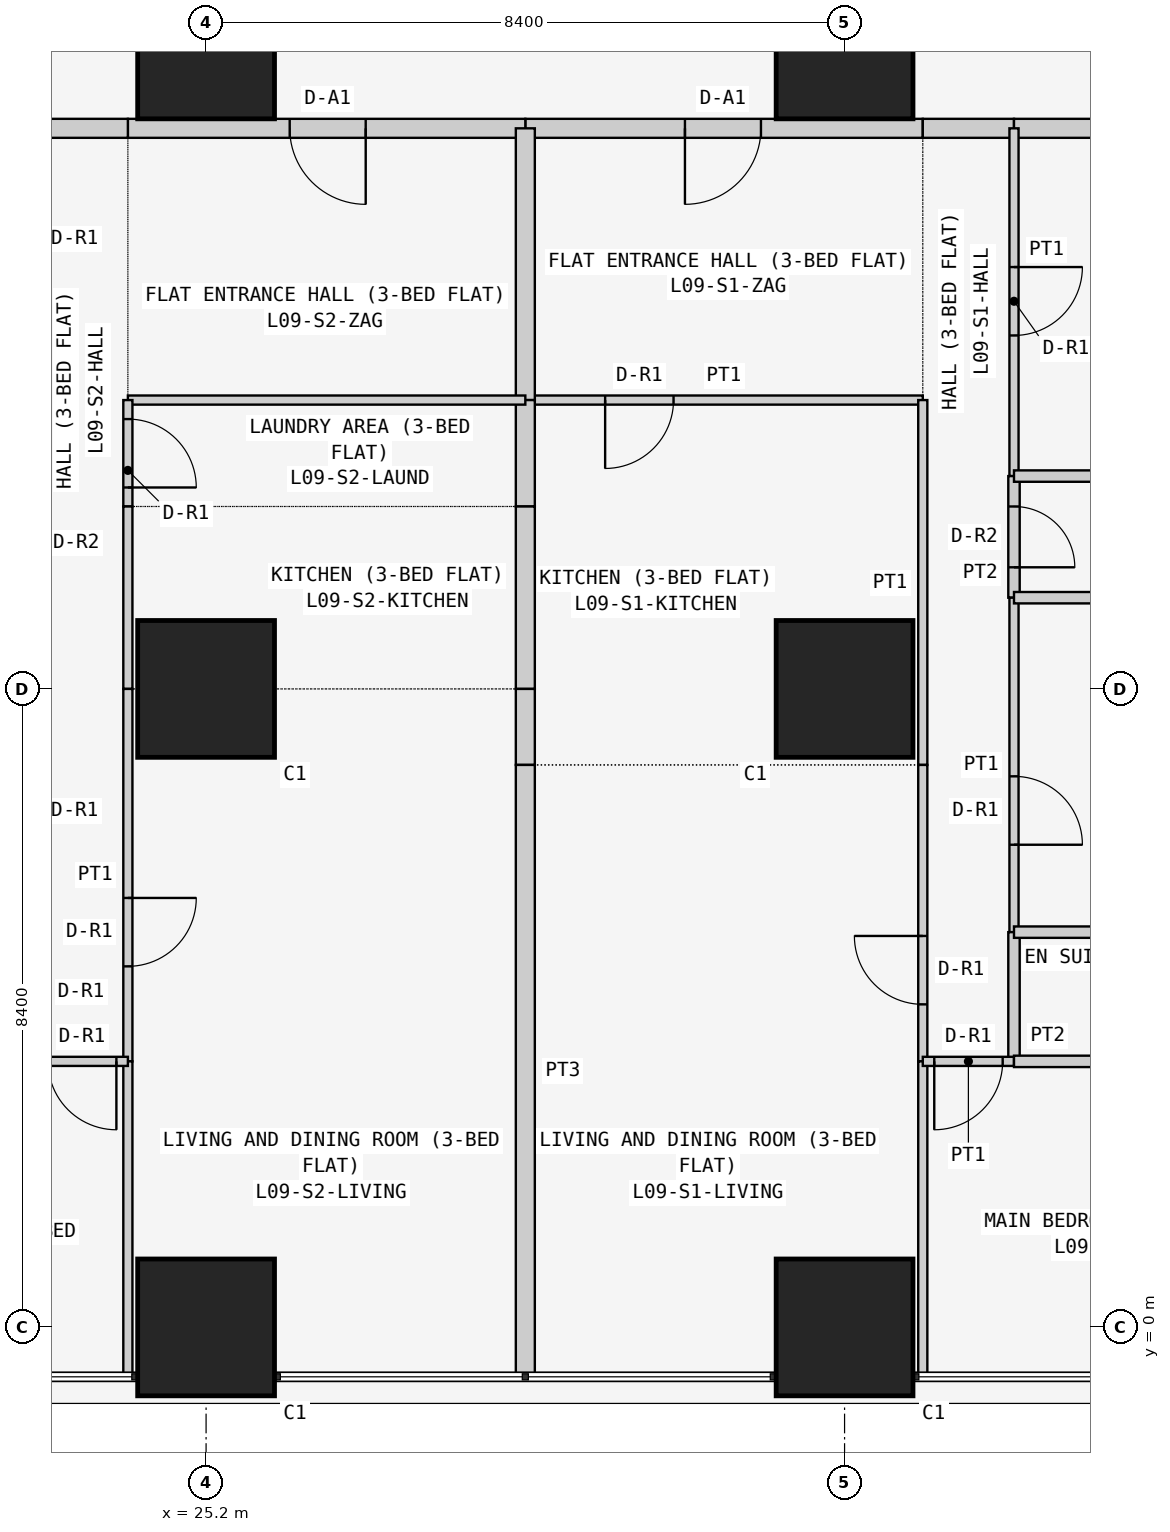
"""IFC4 building model, lengths in metres.
Left out: names, types, materials, properties, quantities, classifications, styles, units other than length and angle.
Written with IfcOpenShell. Run it as: python <this file> out.ifc"""

import sys

from ifc_helpers import new_model, si_unit, direction, frame, frame_2d, origin, origin_2d, place, context, subcontext, project, spatial, rectangle, extrude, element, fill, save


model = new_model("IFC4")
c1 = context("Model", 3, precision=1e-05, world=origin(), true_north=direction((0.0, 1.0)))
c2 = subcontext(c1, "Body", "Model", "MODEL_VIEW")
j1 = project(units=[si_unit("LENGTHUNIT", "METRE"), si_unit("PLANEANGLEUNIT", "RADIAN")], contexts=[c1])
p1 = place(None, origin())
s1 = spatial("IfcSite", under=j1, at=p1, CompositionType="ELEMENT")
p2 = place(p1, origin())
s2 = spatial("IfcBuilding", under=s1, at=p2, CompositionType="ELEMENT")
p3 = place(p2, frame((0.0, 0.0, 41.7)))
s3 = spatial("IfcBuildingStorey", under=s2, at=p3, CompositionType="ELEMENT", Elevation=41.7)
for number, where, z_axis, x_axis in (
    (1, (25.2, 0.0, 0.0), (0.0, 0.0, 1.0), (1.0, 0.0, 0.0)),
    (2, (25.2, 8.4, 0.0), (0.0, 0.0, 1.0), (1.0, 0.0, 0.0)),
    (3, (25.2, 16.8, 0.0), (0.0, 0.0, 1.0), (1.0, 0.0, 0.0)),
    (4, (33.6, 0.0, 0.0), (0.0, 0.0, 1.0), (1.0, 0.0, 0.0)),
    (5, (33.6, 8.4, 0.0), (0.0, 0.0, 1.0), (1.0, 0.0, 0.0)),
    (6, (33.6, 16.8, 0.0), (0.0, 0.0, 1.0), (1.0, 0.0, 0.0)),
):
    element("IfcColumn", number, at=place(p3, frame(where, z_axis=z_axis, x_axis=x_axis)), inside=s3, PredefinedType="COLUMN", context=c2, shape_type="SweptSolid", body=[
        extrude(rectangle(XDim=1.8, YDim=1.8, at=origin_2d()), origin(), (0.0, 0.0, 1.0), 3.6),
    ])
p4 = place(p3, frame((34.629, 15.775, 0.0), z_axis=(0.0, 0.0, 1.0), x_axis=(-1.0, 0.0, 0.0)))
e7 = element("IfcWall", 7, at=p4, inside=s3, PredefinedType="PARTITIONING", context=c2, shape_type="SweptSolid", body=[
    extrude(rectangle(XDim=5.229, YDim=0.25, at=frame_2d((2.615, 0.0))), origin(), (0.0, 0.0, 1.0), 3.45),
])
p5 = place(p4, frame((2.129, 0.0, 0.0)))
e8 = element("IfcOpeningElement", 8, at=p5, cuts=e7, PredefinedType="OPENING", context=c2, shape_type="SweptSolid", body=[
    extrude(rectangle(XDim=1.0, YDim=2.1, at=frame_2d((0.5, 1.05))), frame((0.0, 0.135, 0.0), z_axis=(0.0, -1.0, 0.0), x_axis=(1.0, 0.0, 0.0)), (0.0, 0.0, 1.0), 0.27),
])
p6 = place(p3, frame((35.829, 15.775, 0.0), z_axis=(0.0, 0.0, 1.0), x_axis=(-1.0, 0.0, 0.0)))
e9 = element("IfcWall", 9, at=p6, inside=s3, PredefinedType="PARTITIONING", context=c2, shape_type="SweptSolid", body=[
    extrude(rectangle(XDim=1.2, YDim=0.25, at=frame_2d((0.6, 0.0))), origin(), (0.0, 0.0, 1.0), 3.45),
])
p7 = place(p3, frame((42.7, 15.775, 0.0), z_axis=(0.0, 0.0, 1.0), x_axis=(-1.0, 0.0, 0.0)))
e10 = element("IfcWall", 10, at=p7, inside=s3, PredefinedType="PARTITIONING", context=c2, shape_type="SweptSolid", body=[
    extrude(rectangle(XDim=6.871, YDim=0.25, at=frame_2d((3.436, 0.0))), origin(), (0.0, 0.0, 1.0), 3.45),
])
p8 = place(p3, frame((29.4, 15.775, 0.0), z_axis=(0.0, 0.0, 1.0), x_axis=(-1.0, 0.0, 0.0)))
e11 = element("IfcWall", 11, at=p8, inside=s3, PredefinedType="PARTITIONING", context=c2, shape_type="SweptSolid", body=[
    extrude(rectangle(XDim=5.229, YDim=0.25, at=frame_2d((2.615, 0.0))), origin(), (0.0, 0.0, 1.0), 3.45),
])
p9 = place(p8, frame((2.1, 0.0, 0.0)))
e12 = element("IfcOpeningElement", 12, at=p9, cuts=e11, PredefinedType="OPENING", context=c2, shape_type="SweptSolid", body=[
    extrude(rectangle(XDim=1.0, YDim=2.1, at=frame_2d((0.5, 1.05))), frame((0.0, 0.135, 0.0), z_axis=(0.0, -1.0, 0.0), x_axis=(1.0, 0.0, 0.0)), (0.0, 0.0, 1.0), 0.27),
])
p10 = place(p3, frame((24.171, 15.775, 0.0), z_axis=(0.0, 0.0, 1.0), x_axis=(-1.0, 0.0, 0.0)))
e13 = element("IfcWall", 13, at=p10, inside=s3, PredefinedType="PARTITIONING", context=c2, shape_type="SweptSolid", body=[
    extrude(rectangle(XDim=1.2, YDim=0.25, at=frame_2d((0.6, 0.0))), origin(), (0.0, 0.0, 1.0), 3.45),
])
p11 = place(p3, frame((29.4, 12.2, 0.0), z_axis=(0.0, 0.0, 1.0), x_axis=(1.0, 0.0, 0.0)))
e14 = element("IfcWall", 14, at=p11, inside=s3, PredefinedType="PARTITIONING", context=c2, shape_type="SweptSolid", body=[
    extrude(rectangle(XDim=5.229, YDim=0.12, at=frame_2d((2.615, 0.0))), origin(), (0.0, 0.0, 1.0), 3.45),
])
p12 = place(p11, frame((1.05, 0.0, 0.0)))
e15 = element("IfcOpeningElement", 15, at=p12, cuts=e14, PredefinedType="OPENING", context=c2, shape_type="SweptSolid", body=[
    extrude(rectangle(XDim=0.9, YDim=2.1, at=frame_2d((0.45, 1.05))), frame((0.0, 0.07, 0.0), z_axis=(0.0, -1.0, 0.0), x_axis=(1.0, 0.0, 0.0)), (0.0, 0.0, 1.0), 0.14),
])
p13 = place(p3, frame((29.4, 15.775, 0.0), z_axis=(0.0, 0.0, 1.0), x_axis=(0.0, -1.0, 0.0)))
e16 = element("IfcWall", 16, at=p13, inside=s3, PredefinedType="PARTITIONING", context=c2, shape_type="SweptSolid", body=[
    extrude(rectangle(XDim=3.575, YDim=0.25, at=frame_2d((1.788, 0.0))), origin(), (0.0, 0.0, 1.0), 2.848),
])
p14 = place(p3, frame((34.629, 7.4, 0.0), z_axis=(0.0, 0.0, 1.0), x_axis=(0.0, 1.0, 0.0)))
e17 = element("IfcWall", 17, at=p14, inside=s3, PredefinedType="PARTITIONING", context=c2, shape_type="SweptSolid", body=[
    extrude(rectangle(XDim=4.8, YDim=0.12, at=frame_2d((2.4, 0.0))), origin(), (0.0, 0.0, 1.0), 3.45),
])
p15 = place(p3, frame((29.4, 12.2, 0.0), z_axis=(0.0, 0.0, 1.0), x_axis=(0.0, -1.0, 0.0)))
e18 = element("IfcWall", 18, at=p15, inside=s3, PredefinedType="PARTITIONING", context=c2, shape_type="SweptSolid", body=[
    extrude(rectangle(XDim=1.4, YDim=0.25, at=frame_2d((0.7, 0.0))), origin(), (0.0, 0.0, 1.0), 2.848),
])
p16 = place(p3, frame((29.4, 10.8, 0.0), z_axis=(0.0, 0.0, 1.0), x_axis=(0.0, -1.0, 0.0)))
e19 = element("IfcWall", 19, at=p16, inside=s3, PredefinedType="PARTITIONING", context=c2, shape_type="SweptSolid", body=[
    extrude(rectangle(XDim=2.4, YDim=0.25, at=frame_2d((1.2, 0.0))), origin(), (0.0, 0.0, 1.0), 2.848),
])
p17 = place(p3, frame((29.4, 8.4, 0.0), z_axis=(0.0, 0.0, 1.0), x_axis=(0.0, -1.0, 0.0)))
e20 = element("IfcWall", 20, at=p17, inside=s3, PredefinedType="PARTITIONING", context=c2, shape_type="SweptSolid", body=[
    extrude(rectangle(XDim=1.0, YDim=0.25, at=frame_2d((0.5, 0.0))), origin(), (0.0, 0.0, 1.0), 2.848),
])
p18 = place(p3, frame((34.629, 3.5, 0.0), z_axis=(0.0, 0.0, 1.0), x_axis=(0.0, 1.0, 0.0)))
e21 = element("IfcWall", 21, at=p18, inside=s3, PredefinedType="PARTITIONING", context=c2, shape_type="SweptSolid", body=[
    extrude(rectangle(XDim=3.9, YDim=0.12, at=frame_2d((1.95, 0.0))), origin(), (0.0, 0.0, 1.0), 3.45),
])
p19 = place(p18, frame((0.75, 0.0, 0.0)))
e22 = element("IfcOpeningElement", 22, at=p19, cuts=e21, PredefinedType="OPENING", context=c2, shape_type="SweptSolid", body=[
    extrude(rectangle(XDim=0.9, YDim=2.1, at=frame_2d((0.45, 1.05))), frame((0.0, 0.07, 0.0), z_axis=(0.0, -1.0, 0.0), x_axis=(1.0, 0.0, 0.0)), (0.0, 0.0, 1.0), 0.14),
])
p20 = place(p3, frame((34.629, -0.65, 0.0), z_axis=(0.0, 0.0, 1.0), x_axis=(0.0, 1.0, 0.0)))
e23 = element("IfcWall", 23, at=p20, inside=s3, PredefinedType="PARTITIONING", context=c2, shape_type="SweptSolid", body=[
    extrude(rectangle(XDim=4.15, YDim=0.12, at=frame_2d((2.075, 0.0))), origin(), (0.0, 0.0, 1.0), 3.45),
])
p21 = place(p3, frame((29.4, 7.4, 0.0), z_axis=(0.0, 0.0, 1.0), x_axis=(0.0, -1.0, 0.0)))
e24 = element("IfcWall", 24, at=p21, inside=s3, PredefinedType="PARTITIONING", context=c2, shape_type="SweptSolid", body=[
    extrude(rectangle(XDim=8.05, YDim=0.25, at=frame_2d((4.025, 0.0))), origin(), (0.0, 0.0, 1.0), 2.848),
])
p22 = place(p3, frame((35.829, 11.2, 0.0), z_axis=(0.0, 0.0, 1.0), x_axis=(0.0, 1.0, 0.0)))
e25 = element("IfcWall", 25, at=p22, inside=s3, PredefinedType="PARTITIONING", context=c2, shape_type="SweptSolid", body=[
    extrude(rectangle(XDim=4.575, YDim=0.12, at=frame_2d((2.288, 0.0))), origin(), (0.0, 0.0, 1.0), 3.45),
])
p23 = place(p22, frame((1.85, 0.0, 0.0)))
e26 = element("IfcOpeningElement", 26, at=p23, cuts=e25, PredefinedType="OPENING", context=c2, shape_type="SweptSolid", body=[
    extrude(rectangle(XDim=0.9, YDim=2.1, at=frame_2d((0.45, 1.05))), frame((0.0, 0.07, 0.0), z_axis=(0.0, -1.0, 0.0), x_axis=(1.0, 0.0, 0.0)), (0.0, 0.0, 1.0), 0.14),
])
p24 = place(p3, frame((35.829, 9.6, 0.0), z_axis=(0.0, 0.0, 1.0), x_axis=(0.0, 1.0, 0.0)))
e27 = element("IfcWall", 27, at=p24, inside=s3, PredefinedType="PARTITIONING", context=c2, shape_type="SweptSolid", body=[
    extrude(rectangle(XDim=1.6, YDim=0.15, at=frame_2d((0.8, 0.0))), origin(), (0.0, 0.0, 1.0), 3.45),
])
p25 = place(p24, frame((0.4, 0.0, 0.0)))
e28 = element("IfcOpeningElement", 28, at=p25, cuts=e27, PredefinedType="OPENING", context=c2, shape_type="SweptSolid", body=[
    extrude(rectangle(XDim=0.8, YDim=2.1, at=frame_2d((0.4, 1.05))), frame((0.0, 0.085, 0.0), z_axis=(0.0, -1.0, 0.0), x_axis=(1.0, 0.0, 0.0)), (0.0, 0.0, 1.0), 0.17),
])
p26 = place(p3, frame((35.829, 5.2, 0.0), z_axis=(0.0, 0.0, 1.0), x_axis=(0.0, 1.0, 0.0)))
e29 = element("IfcWall", 29, at=p26, inside=s3, PredefinedType="PARTITIONING", context=c2, shape_type="SweptSolid", body=[
    extrude(rectangle(XDim=4.4, YDim=0.12, at=frame_2d((2.2, 0.0))), origin(), (0.0, 0.0, 1.0), 3.45),
])
p27 = place(p26, frame((1.15, 0.0, 0.0)))
e30 = element("IfcOpeningElement", 30, at=p27, cuts=e29, PredefinedType="OPENING", context=c2, shape_type="SweptSolid", body=[
    extrude(rectangle(XDim=0.9, YDim=2.1, at=frame_2d((0.45, 1.05))), frame((0.0, 0.07, 0.0), z_axis=(0.0, -1.0, 0.0), x_axis=(1.0, 0.0, 0.0)), (0.0, 0.0, 1.0), 0.14),
])
p28 = place(p3, frame((35.829, 3.5, 0.0), z_axis=(0.0, 0.0, 1.0), x_axis=(0.0, 1.0, 0.0)))
e31 = element("IfcWall", 31, at=p28, inside=s3, PredefinedType="PARTITIONING", context=c2, shape_type="SweptSolid", body=[
    extrude(rectangle(XDim=1.7, YDim=0.15, at=frame_2d((0.85, 0.0))), origin(), (0.0, 0.0, 1.0), 3.45),
])
p29 = place(p3, frame((34.629, 3.5, 0.0), z_axis=(0.0, 0.0, 1.0), x_axis=(1.0, 0.0, 0.0)))
e32 = element("IfcWall", 32, at=p29, inside=s3, PredefinedType="PARTITIONING", context=c2, shape_type="SweptSolid", body=[
    extrude(rectangle(XDim=1.2, YDim=0.12, at=frame_2d((0.6, 0.0))), origin(), (0.0, 0.0, 1.0), 3.45),
])
p30 = place(p29, frame((0.151, 0.0, 0.0)))
e33 = element("IfcOpeningElement", 33, at=p30, cuts=e32, PredefinedType="OPENING", context=c2, shape_type="SweptSolid", body=[
    extrude(rectangle(XDim=0.9, YDim=2.1, at=frame_2d((0.45, 1.05))), frame((0.0, 0.07, 0.0), z_axis=(0.0, -1.0, 0.0), x_axis=(1.0, 0.0, 0.0)), (0.0, 0.0, 1.0), 0.14),
])
for number, where, z_axis, x_axis in (
    (34, (35.829, 11.2, 0.0), (0.0, 0.0, 1.0), (1.0, 0.0, 0.0)),
    (35, (35.829, 9.6, 0.0), (0.0, 0.0, 1.0), (1.0, 0.0, 0.0)),
    (36, (35.829, 5.2, 0.0), (0.0, 0.0, 1.0), (1.0, 0.0, 0.0)),
):
    element("IfcWall", number, at=place(p3, frame(where, z_axis=z_axis, x_axis=x_axis)), inside=s3, PredefinedType="PARTITIONING", context=c2, shape_type="SweptSolid", body=[
        extrude(rectangle(XDim=6.871, YDim=0.15, at=frame_2d((3.436, 0.0))), origin(), (0.0, 0.0, 1.0), 3.45),
    ])
p31 = place(p3, frame((35.829, 3.5, 0.0), z_axis=(0.0, 0.0, 1.0), x_axis=(1.0, 0.0, 0.0)))
e37 = element("IfcWall", 37, at=p31, inside=s3, PredefinedType="PARTITIONING", context=c2, shape_type="SweptSolid", body=[
    extrude(rectangle(XDim=6.871, YDim=0.15, at=frame_2d((3.436, 0.0))), origin(), (0.0, 0.0, 1.0), 3.45),
])
p32 = place(p31, frame((3.171, 0.0, 0.0)))
e38 = element("IfcOpeningElement", 38, at=p32, cuts=e37, PredefinedType="OPENING", context=c2, shape_type="SweptSolid", body=[
    extrude(rectangle(XDim=0.8, YDim=2.1, at=frame_2d((0.4, 1.05))), frame((0.0, 0.085, 0.0), z_axis=(0.0, -1.0, 0.0), x_axis=(1.0, 0.0, 0.0)), (0.0, 0.0, 1.0), 0.17),
])
p33 = place(p3, frame((29.4, 12.2, 0.0), z_axis=(0.0, 0.0, 1.0), x_axis=(-1.0, 0.0, 0.0)))
e39 = element("IfcWall", 39, at=p33, inside=s3, PredefinedType="PARTITIONING", context=c2, shape_type="SweptSolid", body=[
    extrude(rectangle(XDim=5.229, YDim=0.12, at=frame_2d((2.615, 0.0))), origin(), (0.0, 0.0, 1.0), 3.45),
])
p34 = place(p3, frame((24.171, 10.8, 0.0), z_axis=(0.0, 0.0, 1.0), x_axis=(0.0, 1.0, 0.0)))
e40 = element("IfcWall", 40, at=p34, inside=s3, PredefinedType="PARTITIONING", context=c2, shape_type="SweptSolid", body=[
    extrude(rectangle(XDim=1.4, YDim=0.12, at=frame_2d((0.7, 0.0))), origin(), (0.0, 0.0, 1.0), 3.45),
])
p35 = place(p34, frame((0.25, 0.0, 0.0)))
e41 = element("IfcOpeningElement", 41, at=p35, cuts=e40, PredefinedType="OPENING", context=c2, shape_type="SweptSolid", body=[
    extrude(rectangle(XDim=0.9, YDim=2.1, at=frame_2d((0.45, 1.05))), frame((0.0, 0.07, 0.0), z_axis=(0.0, -1.0, 0.0), x_axis=(1.0, 0.0, 0.0)), (0.0, 0.0, 1.0), 0.14),
])
p36 = place(p3, frame((24.171, 8.4, 0.0), z_axis=(0.0, 0.0, 1.0), x_axis=(0.0, 1.0, 0.0)))
e42 = element("IfcWall", 42, at=p36, inside=s3, PredefinedType="PARTITIONING", context=c2, shape_type="SweptSolid", body=[
    extrude(rectangle(XDim=2.4, YDim=0.12, at=frame_2d((1.2, 0.0))), origin(), (0.0, 0.0, 1.0), 3.45),
])
p37 = place(p3, frame((24.171, 3.5, 0.0), z_axis=(0.0, 0.0, 1.0), x_axis=(0.0, 1.0, 0.0)))
e43 = element("IfcWall", 43, at=p37, inside=s3, PredefinedType="PARTITIONING", context=c2, shape_type="SweptSolid", body=[
    extrude(rectangle(XDim=4.9, YDim=0.12, at=frame_2d((2.45, 0.0))), origin(), (0.0, 0.0, 1.0), 3.45),
])
p38 = place(p37, frame((1.25, 0.0, 0.0)))
e44 = element("IfcOpeningElement", 44, at=p38, cuts=e43, PredefinedType="OPENING", context=c2, shape_type="SweptSolid", body=[
    extrude(rectangle(XDim=0.9, YDim=2.1, at=frame_2d((0.45, 1.05))), frame((0.0, 0.07, 0.0), z_axis=(0.0, -1.0, 0.0), x_axis=(1.0, 0.0, 0.0)), (0.0, 0.0, 1.0), 0.14),
])
p39 = place(p3, frame((24.171, -0.65, 0.0), z_axis=(0.0, 0.0, 1.0), x_axis=(0.0, 1.0, 0.0)))
e45 = element("IfcWall", 45, at=p39, inside=s3, PredefinedType="PARTITIONING", context=c2, shape_type="SweptSolid", body=[
    extrude(rectangle(XDim=4.15, YDim=0.12, at=frame_2d((2.075, 0.0))), origin(), (0.0, 0.0, 1.0), 3.45),
])
p40 = place(p3, frame((24.171, 3.5, 0.0), z_axis=(0.0, 0.0, 1.0), x_axis=(-1.0, 0.0, 0.0)))
e46 = element("IfcWall", 46, at=p40, inside=s3, PredefinedType="PARTITIONING", context=c2, shape_type="SweptSolid", body=[
    extrude(rectangle(XDim=1.2, YDim=0.12, at=frame_2d((0.6, 0.0))), origin(), (0.0, 0.0, 1.0), 3.45),
])
p41 = place(p40, frame((0.151, 0.0, 0.0)))
e47 = element("IfcOpeningElement", 47, at=p41, cuts=e46, PredefinedType="OPENING", context=c2, shape_type="SweptSolid", body=[
    extrude(rectangle(XDim=0.9, YDim=2.1, at=frame_2d((0.45, 1.05))), frame((0.0, 0.07, 0.0), z_axis=(0.0, -1.0, 0.0), x_axis=(1.0, 0.0, 0.0)), (0.0, 0.0, 1.0), 0.14),
])
p42 = place(p5, origin())
e48 = element("IfcDoor", 48, at=p42, inside=s3, OperationType="SINGLE_SWING_RIGHT", PredefinedType="DOOR", context=c2, shape_type="SweptSolid", body=[
    extrude(rectangle(XDim=1.0, YDim=2.1, at=frame_2d((0.5, 1.05))), frame((0.0, 0.025, 0.0), z_axis=(0.0, -1.0, 0.0), x_axis=(1.0, 0.0, 0.0)), (0.0, 0.0, 1.0), 0.05),
])
fill(e8, e48)
p43 = place(p12, frame((0.9, 0.0, 0.0), z_axis=(0.0, 0.0, 1.0), x_axis=(-1.0, 0.0, 0.0)))
e49 = element("IfcDoor", 49, at=p43, inside=s3, OperationType="SINGLE_SWING_RIGHT", PredefinedType="DOOR", context=c2, shape_type="SweptSolid", body=[
    extrude(rectangle(XDim=0.9, YDim=2.1, at=frame_2d((0.45, 1.05))), frame((0.0, 0.025, 0.0), z_axis=(0.0, -1.0, 0.0), x_axis=(1.0, 0.0, 0.0)), (0.0, 0.0, 1.0), 0.05),
])
fill(e15, e49)
p44 = place(p19, origin())
e50 = element("IfcDoor", 50, at=p44, inside=s3, OperationType="SINGLE_SWING_RIGHT", PredefinedType="DOOR", context=c2, shape_type="SweptSolid", body=[
    extrude(rectangle(XDim=0.9, YDim=2.1, at=frame_2d((0.45, 1.05))), frame((0.0, 0.025, 0.0), z_axis=(0.0, -1.0, 0.0), x_axis=(1.0, 0.0, 0.0)), (0.0, 0.0, 1.0), 0.05),
])
fill(e22, e50)
p45 = place(p23, frame((0.9, 0.0, 0.0), z_axis=(0.0, 0.0, 1.0), x_axis=(-1.0, 0.0, 0.0)))
e51 = element("IfcDoor", 51, at=p45, inside=s3, OperationType="SINGLE_SWING_LEFT", PredefinedType="DOOR", context=c2, shape_type="SweptSolid", body=[
    extrude(rectangle(XDim=0.9, YDim=2.1, at=frame_2d((0.45, 1.05))), frame((0.0, 0.025, 0.0), z_axis=(0.0, -1.0, 0.0), x_axis=(1.0, 0.0, 0.0)), (0.0, 0.0, 1.0), 0.05),
])
fill(e26, e51)
p46 = place(p25, frame((0.8, 0.0, 0.0), z_axis=(0.0, 0.0, 1.0), x_axis=(-1.0, 0.0, 0.0)))
e52 = element("IfcDoor", 52, at=p46, inside=s3, OperationType="SINGLE_SWING_RIGHT", PredefinedType="DOOR", context=c2, shape_type="SweptSolid", body=[
    extrude(rectangle(XDim=0.8, YDim=2.1, at=frame_2d((0.4, 1.05))), frame((0.0, 0.025, 0.0), z_axis=(0.0, -1.0, 0.0), x_axis=(1.0, 0.0, 0.0)), (0.0, 0.0, 1.0), 0.05),
])
fill(e28, e52)
p47 = place(p27, frame((0.9, 0.0, 0.0), z_axis=(0.0, 0.0, 1.0), x_axis=(-1.0, 0.0, 0.0)))
e53 = element("IfcDoor", 53, at=p47, inside=s3, OperationType="SINGLE_SWING_RIGHT", PredefinedType="DOOR", context=c2, shape_type="SweptSolid", body=[
    extrude(rectangle(XDim=0.9, YDim=2.1, at=frame_2d((0.45, 1.05))), frame((0.0, 0.025, 0.0), z_axis=(0.0, -1.0, 0.0), x_axis=(1.0, 0.0, 0.0)), (0.0, 0.0, 1.0), 0.05),
])
fill(e30, e53)
p48 = place(p30, frame((0.9, 0.0, 0.0), z_axis=(0.0, 0.0, 1.0), x_axis=(-1.0, 0.0, 0.0)))
e54 = element("IfcDoor", 54, at=p48, inside=s3, OperationType="SINGLE_SWING_RIGHT", PredefinedType="DOOR", context=c2, shape_type="SweptSolid", body=[
    extrude(rectangle(XDim=0.9, YDim=2.1, at=frame_2d((0.45, 1.05))), frame((0.0, 0.025, 0.0), z_axis=(0.0, -1.0, 0.0), x_axis=(1.0, 0.0, 0.0)), (0.0, 0.0, 1.0), 0.05),
])
fill(e33, e54)
p49 = place(p9, origin())
e55 = element("IfcDoor", 55, at=p49, inside=s3, OperationType="SINGLE_SWING_LEFT", PredefinedType="DOOR", context=c2, shape_type="SweptSolid", body=[
    extrude(rectangle(XDim=1.0, YDim=2.1, at=frame_2d((0.5, 1.05))), frame((0.0, 0.025, 0.0), z_axis=(0.0, -1.0, 0.0), x_axis=(1.0, 0.0, 0.0)), (0.0, 0.0, 1.0), 0.05),
])
fill(e12, e55)
p50 = place(p35, frame((0.9, 0.0, 0.0), z_axis=(0.0, 0.0, 1.0), x_axis=(-1.0, 0.0, 0.0)))
e56 = element("IfcDoor", 56, at=p50, inside=s3, OperationType="SINGLE_SWING_RIGHT", PredefinedType="DOOR", context=c2, shape_type="SweptSolid", body=[
    extrude(rectangle(XDim=0.9, YDim=2.1, at=frame_2d((0.45, 1.05))), frame((0.0, 0.025, 0.0), z_axis=(0.0, -1.0, 0.0), x_axis=(1.0, 0.0, 0.0)), (0.0, 0.0, 1.0), 0.05),
])
fill(e41, e56)
p51 = place(p38, frame((0.9, 0.0, 0.0), z_axis=(0.0, 0.0, 1.0), x_axis=(-1.0, 0.0, 0.0)))
e57 = element("IfcDoor", 57, at=p51, inside=s3, OperationType="SINGLE_SWING_LEFT", PredefinedType="DOOR", context=c2, shape_type="SweptSolid", body=[
    extrude(rectangle(XDim=0.9, YDim=2.1, at=frame_2d((0.45, 1.05))), frame((0.0, 0.025, 0.0), z_axis=(0.0, -1.0, 0.0), x_axis=(1.0, 0.0, 0.0)), (0.0, 0.0, 1.0), 0.05),
])
fill(e44, e57)
p52 = place(p41, origin())
e58 = element("IfcDoor", 58, at=p52, inside=s3, OperationType="SINGLE_SWING_LEFT", PredefinedType="DOOR", context=c2, shape_type="SweptSolid", body=[
    extrude(rectangle(XDim=0.9, YDim=2.1, at=frame_2d((0.45, 1.05))), frame((0.0, 0.025, 0.0), z_axis=(0.0, -1.0, 0.0), x_axis=(1.0, 0.0, 0.0)), (0.0, 0.0, 1.0), 0.05),
])
fill(e47, e58)
save(model, sys.argv[1])
